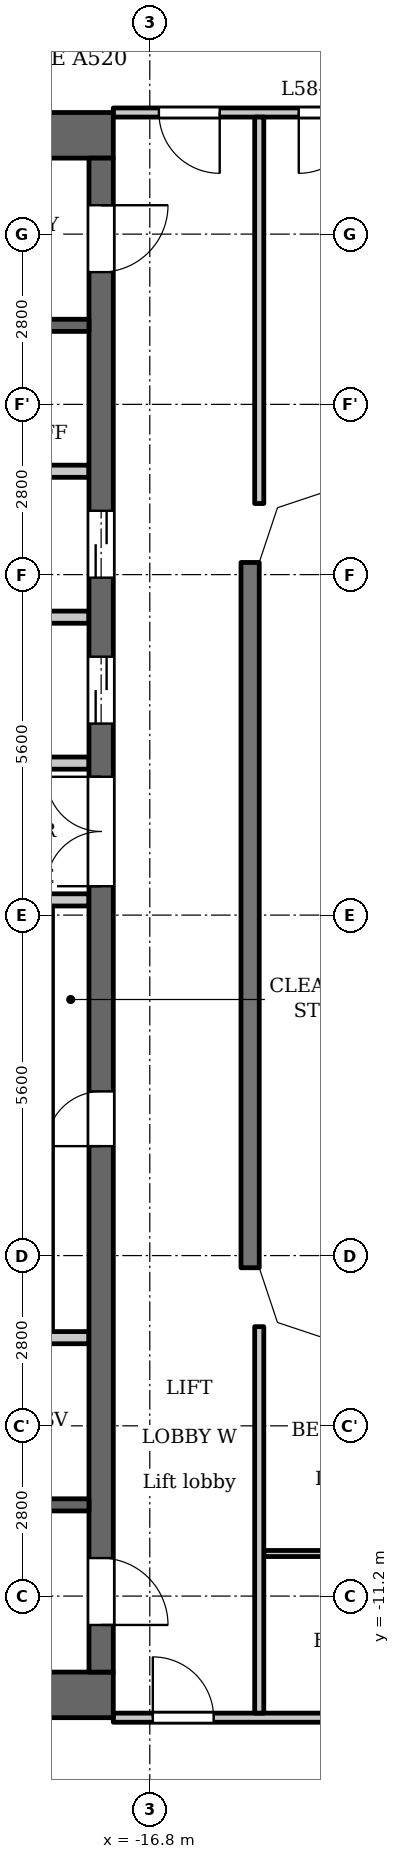
"""IFC4 building model, lengths in metres.
Left out: names, types, materials, properties, quantities, classifications, styles, units other than length and angle.
Written with IfcOpenShell. Run it as: python <this file> out.ifc"""

import sys

from ifc_helpers import new_model, si_unit, direction, frame, frame_2d, origin, place, context, subcontext, project, spatial, polyline, rectangle, outline, extrude, element, fill, save


model = new_model("IFC4")
c1 = context("Model", 3, precision=1e-05, world=origin(), true_north=direction((0.0, 1.0)))
c2 = subcontext(c1, "Body", "Model", "MODEL_VIEW")
j1 = project(units=[si_unit("LENGTHUNIT", "METRE"), si_unit("PLANEANGLEUNIT", "RADIAN")], contexts=[c1])
p1 = place(None, origin())
s1 = spatial("IfcSite", under=j1, at=p1, CompositionType="ELEMENT")
p2 = place(p1, origin())
s2 = spatial("IfcBuilding", under=s1, at=p2, CompositionType="ELEMENT")
p3 = place(p2, frame((0.0, 0.0, 223.9)))
s3 = spatial("IfcBuildingStorey", under=s2, at=p3, CompositionType="ELEMENT", Elevation=223.9)
p4 = place(p3, frame((-15.15, -5.8, 0.0), z_axis=(0.0, 0.0, 1.0), x_axis=(0.0, 1.0, 0.0)))
e1 = element("IfcWall", 1, at=p4, inside=s3, PredefinedType="SOLIDWALL", context=c2, shape_type="SweptSolid", body=[
    extrude(rectangle(XDim=11.6, YDim=0.3, at=frame_2d((5.8, 0.0))), origin(), (0.0, 0.0, 1.0), 3.2),
])
for number, where, z_axis, x_axis in (
    (2, (-17.4, 12.825, 0.0), (0.0, 0.0, 1.0), (-1.0, 0.0, 0.0)),
    (3, (-17.4, -12.825, 0.0), (0.0, 0.0, 1.0), (-1.0, 0.0, 0.0)),
):
    element("IfcWall", number, at=place(p3, frame(where, z_axis=z_axis, x_axis=x_axis)), inside=s3, PredefinedType="SHEAR", context=c2, shape_type="SweptSolid", body=[
        extrude(rectangle(XDim=7.6, YDim=0.75, at=frame_2d((3.8, 0.0))), origin(), (0.0, 0.0, 1.0), 3.2),
    ])
p5 = place(p3, frame((-17.6, -12.45, 0.0), z_axis=(0.0, 0.0, 1.0), x_axis=(0.0, 1.0, 0.0)))
e4 = element("IfcWall", 4, at=p5, inside=s3, PredefinedType="SHEAR", context=c2, shape_type="SweptSolid", body=[
    extrude(rectangle(XDim=24.9, YDim=0.4, at=frame_2d((12.45, 0.0))), origin(), (0.0, 0.0, 1.0), 3.2),
])
p6 = place(p5, frame((8.65, 0.0, 0.0)))
e5 = element("IfcOpeningElement", 5, at=p6, cuts=e4, PredefinedType="OPENING", context=c2, shape_type="SweptSolid", body=[
    extrude(rectangle(XDim=0.9, YDim=2.1, at=frame_2d((0.45, 1.05))), frame((0.0, 0.21, 0.0), z_axis=(0.0, -1.0, 0.0), x_axis=(1.0, 0.0, 0.0)), (0.0, 0.0, 1.0), 0.42),
])
p7 = place(p5, frame((15.6, 0.0, 0.0)))
e6 = element("IfcOpeningElement", 6, at=p7, cuts=e4, PredefinedType="OPENING", context=c2, shape_type="SweptSolid", body=[
    extrude(rectangle(XDim=1.1, YDim=2.1, at=frame_2d((0.55, 1.05))), frame((0.0, 0.21, 0.0), z_axis=(0.0, -1.0, 0.0), x_axis=(1.0, 0.0, 0.0)), (0.0, 0.0, 1.0), 0.42),
])
p8 = place(p5, frame((18.0, 0.0, 0.0)))
e7 = element("IfcOpeningElement", 7, at=p8, cuts=e4, PredefinedType="OPENING", context=c2, shape_type="SweptSolid", body=[
    extrude(rectangle(XDim=1.1, YDim=2.1, at=frame_2d((0.55, 1.05))), frame((0.0, 0.21, 0.0), z_axis=(0.0, -1.0, 0.0), x_axis=(1.0, 0.0, 0.0)), (0.0, 0.0, 1.0), 0.42),
])
p9 = place(p5, frame((23.025, 0.0, 0.0)))
e8 = element("IfcOpeningElement", 8, at=p9, cuts=e4, PredefinedType="OPENING", context=c2, shape_type="SweptSolid", body=[
    extrude(rectangle(XDim=1.1, YDim=2.1, at=frame_2d((0.55, 1.05))), frame((0.0, 0.21, 0.0), z_axis=(0.0, -1.0, 0.0), x_axis=(1.0, 0.0, 0.0)), (0.0, 0.0, 1.0), 0.42),
])
p10 = place(p5, frame((0.775, 0.0, 0.0)))
e9 = element("IfcOpeningElement", 9, at=p10, cuts=e4, PredefinedType="OPENING", context=c2, shape_type="SweptSolid", body=[
    extrude(rectangle(XDim=1.1, YDim=2.1, at=frame_2d((0.55, 1.05))), frame((0.0, 0.21, 0.0), z_axis=(0.0, -1.0, 0.0), x_axis=(1.0, 0.0, 0.0)), (0.0, 0.0, 1.0), 0.42),
])
p11 = place(p5, frame((12.925, 0.0, 0.0)))
e10 = element("IfcOpeningElement", 10, at=p11, cuts=e4, PredefinedType="OPENING", context=c2, shape_type="SweptSolid", body=[
    extrude(rectangle(XDim=1.8, YDim=2.1, at=frame_2d((0.9, 1.05))), frame((0.0, 0.21, 0.0), z_axis=(0.0, -1.0, 0.0), x_axis=(1.0, 0.0, 0.0)), (0.0, 0.0, 1.0), 0.42),
])
p12 = place(p3, frame((-17.8, -9.7, 0.0), z_axis=(0.0, 0.0, 1.0), x_axis=(-1.0, 0.0, 0.0)))
e11 = element("IfcWall", 11, at=p12, inside=s3, PredefinedType="SHEAR", context=c2, shape_type="SweptSolid", body=[
    extrude(rectangle(XDim=5.65, YDim=0.2, at=frame_2d((2.825, 0.0))), origin(), (0.0, 0.0, 1.0), 3.2),
])
p13 = place(p12, frame((0.85, 0.0, 0.0)))
e12 = element("IfcOpeningElement", 12, at=p13, cuts=e11, PredefinedType="OPENING", context=c2, shape_type="SweptSolid", body=[
    extrude(rectangle(XDim=1.1, YDim=2.1, at=frame_2d((0.55, 1.05))), frame((0.0, 0.11, 0.0), z_axis=(0.0, -1.0, 0.0), x_axis=(1.0, 0.0, 0.0)), (0.0, 0.0, 1.0), 0.22),
])
p14 = place(p12, frame((3.75, 0.0, 0.0)))
e13 = element("IfcOpeningElement", 13, at=p14, cuts=e11, PredefinedType="OPENING", context=c2, shape_type="SweptSolid", body=[
    extrude(rectangle(XDim=1.1, YDim=2.1, at=frame_2d((0.55, 1.05))), frame((0.0, 0.11, 0.0), z_axis=(0.0, -1.0, 0.0), x_axis=(1.0, 0.0, 0.0)), (0.0, 0.0, 1.0), 0.22),
])
p15 = place(p3, frame((-17.8, -6.95, 0.0), z_axis=(0.0, 0.0, 1.0), x_axis=(-1.0, 0.0, 0.0)))
e14 = element("IfcWall", 14, at=p15, inside=s3, PredefinedType="PARTITIONING", context=c2, shape_type="SweptSolid", body=[
    extrude(rectangle(XDim=2.8, YDim=0.2, at=frame_2d((1.4, 0.0))), origin(), (0.0, 0.0, 1.0), 3.2),
])
p16 = place(p3, frame((-17.8, 0.25, 0.0), z_axis=(0.0, 0.0, 1.0), x_axis=(-1.0, 0.0, 0.0)))
e15 = element("IfcWall", 15, at=p16, inside=s3, PredefinedType="PARTITIONING", context=c2, shape_type="SweptSolid", body=[
    extrude(rectangle(XDim=3.0, YDim=0.2, at=frame_2d((1.5, 0.0))), origin(), (0.0, 0.0, 1.0), 3.2),
])
p17 = place(p16, frame((1.35, 0.0, 0.0)))
e16 = element("IfcOpeningElement", 16, at=p17, cuts=e15, PredefinedType="OPENING", context=c2, shape_type="SweptSolid", body=[
    extrude(rectangle(XDim=0.9, YDim=2.1, at=frame_2d((0.45, 1.05))), frame((0.0, 0.11, 0.0), z_axis=(0.0, -1.0, 0.0), x_axis=(1.0, 0.0, 0.0)), (0.0, 0.0, 1.0), 0.22),
])
p18 = place(p3, frame((-17.8, 2.5, 0.0), z_axis=(0.0, 0.0, 1.0), x_axis=(-1.0, 0.0, 0.0)))
e17 = element("IfcWall", 17, at=p18, inside=s3, PredefinedType="PARTITIONING", context=c2, shape_type="SweptSolid", body=[
    extrude(rectangle(XDim=3.0, YDim=0.2, at=frame_2d((1.5, 0.0))), origin(), (0.0, 0.0, 1.0), 3.2),
])
for number, where, z_axis, x_axis in (
    (18, (-17.8, 4.9, 0.0), (0.0, 0.0, 1.0), (-1.0, 0.0, 0.0)),
    (19, (-17.8, 7.3, 0.0), (0.0, 0.0, 1.0), (-1.0, 0.0, 0.0)),
):
    element("IfcWall", number, at=place(p3, frame(where, z_axis=z_axis, x_axis=x_axis)), inside=s3, PredefinedType="PARTITIONING", context=c2, shape_type="SweptSolid", body=[
        extrude(rectangle(XDim=2.8, YDim=0.2, at=frame_2d((1.4, 0.0))), origin(), (0.0, 0.0, 1.0), 3.2),
    ])
p19 = place(p3, frame((-17.8, 9.7, 0.0), z_axis=(0.0, 0.0, 1.0), x_axis=(-1.0, 0.0, 0.0)))
e20 = element("IfcWall", 20, at=p19, inside=s3, PredefinedType="SHEAR", context=c2, shape_type="SweptSolid", body=[
    extrude(rectangle(XDim=5.65, YDim=0.2, at=frame_2d((2.825, 0.0))), origin(), (0.0, 0.0, 1.0), 3.2),
])
p20 = place(p19, frame((0.85, 0.0, 0.0)))
e21 = element("IfcOpeningElement", 21, at=p20, cuts=e20, PredefinedType="OPENING", context=c2, shape_type="SweptSolid", body=[
    extrude(rectangle(XDim=1.1, YDim=2.1, at=frame_2d((0.55, 1.05))), frame((0.0, 0.11, 0.0), z_axis=(0.0, -1.0, 0.0), x_axis=(1.0, 0.0, 0.0)), (0.0, 0.0, 1.0), 0.22),
])
p21 = place(p19, frame((3.75, 0.0, 0.0)))
e22 = element("IfcOpeningElement", 22, at=p21, cuts=e20, PredefinedType="OPENING", context=c2, shape_type="SweptSolid", body=[
    extrude(rectangle(XDim=1.1, YDim=2.1, at=frame_2d((0.55, 1.05))), frame((0.0, 0.11, 0.0), z_axis=(0.0, -1.0, 0.0), x_axis=(1.0, 0.0, 0.0)), (0.0, 0.0, 1.0), 0.22),
])
p22 = place(p3, frame((-17.4, -13.2, 0.0), z_axis=(0.0, 0.0, 1.0), x_axis=(1.0, 0.0, 0.0)))
e23 = element("IfcWall", 23, at=p22, inside=s3, PredefinedType="PARTITIONING", context=c2, shape_type="SweptSolid", body=[
    extrude(rectangle(XDim=34.8, YDim=0.15, at=frame_2d((17.4, 0.0))), origin(), (0.0, 0.0, 1.0), 3.2),
])
p23 = place(p22, frame((0.65, 0.0, 0.0)))
e24 = element("IfcOpeningElement", 24, at=p23, cuts=e23, PredefinedType="OPENING", context=c2, shape_type="SweptSolid", body=[
    extrude(rectangle(XDim=1.0, YDim=2.1, at=frame_2d((0.5, 1.05))), frame((0.0, 0.085, 0.0), z_axis=(0.0, -1.0, 0.0), x_axis=(1.0, 0.0, 0.0)), (0.0, 0.0, 1.0), 0.17),
])
p24 = place(p22, frame((33.05, 0.0, 0.0)))
e25 = element("IfcOpeningElement", 25, at=p24, cuts=e23, PredefinedType="OPENING", context=c2, shape_type="SweptSolid", body=[
    extrude(rectangle(XDim=1.0, YDim=2.1, at=frame_2d((0.5, 1.05))), frame((0.0, 0.085, 0.0), z_axis=(0.0, -1.0, 0.0), x_axis=(1.0, 0.0, 0.0)), (0.0, 0.0, 1.0), 0.17),
])
p25 = place(p22, frame((10.15, 0.0, 0.0)))
e26 = element("IfcOpeningElement", 26, at=p25, cuts=e23, PredefinedType="OPENING", context=c2, shape_type="SweptSolid", body=[
    extrude(rectangle(XDim=1.0, YDim=2.1, at=frame_2d((0.5, 1.05))), frame((0.0, 0.085, 0.0), z_axis=(0.0, -1.0, 0.0), x_axis=(1.0, 0.0, 0.0)), (0.0, 0.0, 1.0), 0.17),
])
p26 = place(p22, frame((12.5, 0.0, 0.0)))
e27 = element("IfcOpeningElement", 27, at=p26, cuts=e23, PredefinedType="OPENING", context=c2, shape_type="SweptSolid", body=[
    extrude(rectangle(XDim=1.0, YDim=2.1, at=frame_2d((0.5, 1.05))), frame((0.0, 0.085, 0.0), z_axis=(0.0, -1.0, 0.0), x_axis=(1.0, 0.0, 0.0)), (0.0, 0.0, 1.0), 0.17),
])
p27 = place(p22, frame((18.0, 0.0, 0.0)))
e28 = element("IfcOpeningElement", 28, at=p27, cuts=e23, PredefinedType="OPENING", context=c2, shape_type="SweptSolid", body=[
    extrude(rectangle(XDim=1.0, YDim=2.1, at=frame_2d((0.5, 1.05))), frame((0.0, 0.085, 0.0), z_axis=(0.0, -1.0, 0.0), x_axis=(1.0, 0.0, 0.0)), (0.0, 0.0, 1.0), 0.17),
])
p28 = place(p22, frame((30.75, 0.0, 0.0)))
e29 = element("IfcOpeningElement", 29, at=p28, cuts=e23, PredefinedType="OPENING", context=c2, shape_type="SweptSolid", body=[
    extrude(rectangle(XDim=1.0, YDim=2.1, at=frame_2d((0.5, 1.05))), frame((0.0, 0.085, 0.0), z_axis=(0.0, -1.0, 0.0), x_axis=(1.0, 0.0, 0.0)), (0.0, 0.0, 1.0), 0.17),
])
p29 = place(p3, frame((-14.925, -10.5, 0.0), z_axis=(0.0, 0.0, 1.0), x_axis=(1.0, 0.0, 0.0)))
e30 = element("IfcWall", 30, at=p29, inside=s3, PredefinedType="PARTITIONING", context=c2, shape_type="SweptSolid", body=[
    extrude(rectangle(XDim=29.85, YDim=0.1, at=frame_2d((14.925, 0.0))), origin(), (0.0, 0.0, 1.0), 3.2),
])
p30 = place(p29, frame((2.325, 0.0, 0.0)))
e31 = element("IfcOpeningElement", 31, at=p30, cuts=e30, PredefinedType="OPENING", context=c2, shape_type="SweptSolid", body=[
    extrude(rectangle(XDim=0.8, YDim=2.1, at=frame_2d((0.4, 1.05))), frame((0.0, 0.06, 0.0), z_axis=(0.0, -1.0, 0.0), x_axis=(1.0, 0.0, 0.0)), (0.0, 0.0, 1.0), 0.12),
])
p31 = place(p29, frame((7.775, 0.0, 0.0)))
e32 = element("IfcOpeningElement", 32, at=p31, cuts=e30, PredefinedType="OPENING", context=c2, shape_type="SweptSolid", body=[
    extrude(rectangle(XDim=0.9, YDim=2.1, at=frame_2d((0.45, 1.05))), frame((0.0, 0.06, 0.0), z_axis=(0.0, -1.0, 0.0), x_axis=(1.0, 0.0, 0.0)), (0.0, 0.0, 1.0), 0.12),
])
p32 = place(p29, frame((13.575, 0.0, 0.0)))
e33 = element("IfcOpeningElement", 33, at=p32, cuts=e30, PredefinedType="OPENING", context=c2, shape_type="SweptSolid", body=[
    extrude(rectangle(XDim=0.8, YDim=2.1, at=frame_2d((0.4, 1.05))), frame((0.0, 0.06, 0.0), z_axis=(0.0, -1.0, 0.0), x_axis=(1.0, 0.0, 0.0)), (0.0, 0.0, 1.0), 0.12),
])
p33 = place(p29, frame((10.125, 0.0, 0.0)))
e34 = element("IfcOpeningElement", 34, at=p33, cuts=e30, PredefinedType="OPENING", context=c2, shape_type="SweptSolid", body=[
    extrude(rectangle(XDim=0.9, YDim=2.1, at=frame_2d((0.45, 1.05))), frame((0.0, 0.06, 0.0), z_axis=(0.0, -1.0, 0.0), x_axis=(1.0, 0.0, 0.0)), (0.0, 0.0, 1.0), 0.12),
])
p34 = place(p29, frame((18.825, 0.0, 0.0)))
e35 = element("IfcOpeningElement", 35, at=p34, cuts=e30, PredefinedType="OPENING", context=c2, shape_type="SweptSolid", body=[
    extrude(rectangle(XDim=0.8, YDim=2.1, at=frame_2d((0.4, 1.05))), frame((0.0, 0.06, 0.0), z_axis=(0.0, -1.0, 0.0), x_axis=(1.0, 0.0, 0.0)), (0.0, 0.0, 1.0), 0.12),
])
p35 = place(p29, frame((15.625, 0.0, 0.0)))
e36 = element("IfcOpeningElement", 36, at=p35, cuts=e30, PredefinedType="OPENING", context=c2, shape_type="SweptSolid", body=[
    extrude(rectangle(XDim=0.9, YDim=2.1, at=frame_2d((0.45, 1.05))), frame((0.0, 0.06, 0.0), z_axis=(0.0, -1.0, 0.0), x_axis=(1.0, 0.0, 0.0)), (0.0, 0.0, 1.0), 0.12),
])
p36 = place(p29, frame((24.675, 0.0, 0.0)))
e37 = element("IfcOpeningElement", 37, at=p36, cuts=e30, PredefinedType="OPENING", context=c2, shape_type="SweptSolid", body=[
    extrude(rectangle(XDim=0.8, YDim=2.1, at=frame_2d((0.4, 1.05))), frame((0.0, 0.06, 0.0), z_axis=(0.0, -1.0, 0.0), x_axis=(1.0, 0.0, 0.0)), (0.0, 0.0, 1.0), 0.12),
])
p37 = place(p29, frame((28.375, 0.0, 0.0)))
e38 = element("IfcOpeningElement", 38, at=p37, cuts=e30, PredefinedType="OPENING", context=c2, shape_type="SweptSolid", body=[
    extrude(rectangle(XDim=0.9, YDim=2.1, at=frame_2d((0.45, 1.05))), frame((0.0, 0.06, 0.0), z_axis=(0.0, -1.0, 0.0), x_axis=(1.0, 0.0, 0.0)), (0.0, 0.0, 1.0), 0.12),
])
p38 = place(p3, frame((-17.4, 13.2, 0.0), z_axis=(0.0, 0.0, 1.0), x_axis=(1.0, 0.0, 0.0)))
e39 = element("IfcWall", 39, at=p38, inside=s3, PredefinedType="PARTITIONING", context=c2, shape_type="SweptSolid", body=[
    extrude(rectangle(XDim=34.8, YDim=0.15, at=frame_2d((17.4, 0.0))), origin(), (0.0, 0.0, 1.0), 3.2),
])
p39 = place(p38, frame((0.75, 0.0, 0.0)))
e40 = element("IfcOpeningElement", 40, at=p39, cuts=e39, PredefinedType="OPENING", context=c2, shape_type="SweptSolid", body=[
    extrude(rectangle(XDim=1.0, YDim=2.1, at=frame_2d((0.5, 1.05))), frame((0.0, 0.085, 0.0), z_axis=(0.0, -1.0, 0.0), x_axis=(1.0, 0.0, 0.0)), (0.0, 0.0, 1.0), 0.17),
])
p40 = place(p38, frame((33.15, 0.0, 0.0)))
e41 = element("IfcOpeningElement", 41, at=p40, cuts=e39, PredefinedType="OPENING", context=c2, shape_type="SweptSolid", body=[
    extrude(rectangle(XDim=1.0, YDim=2.1, at=frame_2d((0.5, 1.05))), frame((0.0, 0.085, 0.0), z_axis=(0.0, -1.0, 0.0), x_axis=(1.0, 0.0, 0.0)), (0.0, 0.0, 1.0), 0.17),
])
p41 = place(p38, frame((3.05, 0.0, 0.0)))
e42 = element("IfcOpeningElement", 42, at=p41, cuts=e39, PredefinedType="OPENING", context=c2, shape_type="SweptSolid", body=[
    extrude(rectangle(XDim=1.0, YDim=2.1, at=frame_2d((0.5, 1.05))), frame((0.0, 0.085, 0.0), z_axis=(0.0, -1.0, 0.0), x_axis=(1.0, 0.0, 0.0)), (0.0, 0.0, 1.0), 0.17),
])
p42 = place(p38, frame((10.1, 0.0, 0.0)))
e43 = element("IfcOpeningElement", 43, at=p42, cuts=e39, PredefinedType="OPENING", context=c2, shape_type="SweptSolid", body=[
    extrude(rectangle(XDim=1.0, YDim=2.1, at=frame_2d((0.5, 1.05))), frame((0.0, 0.085, 0.0), z_axis=(0.0, -1.0, 0.0), x_axis=(1.0, 0.0, 0.0)), (0.0, 0.0, 1.0), 0.17),
])
p43 = place(p38, frame((12.45, 0.0, 0.0)))
e44 = element("IfcOpeningElement", 44, at=p43, cuts=e39, PredefinedType="OPENING", context=c2, shape_type="SweptSolid", body=[
    extrude(rectangle(XDim=1.0, YDim=2.1, at=frame_2d((0.5, 1.05))), frame((0.0, 0.085, 0.0), z_axis=(0.0, -1.0, 0.0), x_axis=(1.0, 0.0, 0.0)), (0.0, 0.0, 1.0), 0.17),
])
p44 = place(p38, frame((21.3, 0.0, 0.0)))
e45 = element("IfcOpeningElement", 45, at=p44, cuts=e39, PredefinedType="OPENING", context=c2, shape_type="SweptSolid", body=[
    extrude(rectangle(XDim=1.0, YDim=2.1, at=frame_2d((0.5, 1.05))), frame((0.0, 0.085, 0.0), z_axis=(0.0, -1.0, 0.0), x_axis=(1.0, 0.0, 0.0)), (0.0, 0.0, 1.0), 0.17),
])
p45 = place(p38, frame((23.65, 0.0, 0.0)))
e46 = element("IfcOpeningElement", 46, at=p45, cuts=e39, PredefinedType="OPENING", context=c2, shape_type="SweptSolid", body=[
    extrude(rectangle(XDim=1.0, YDim=2.1, at=frame_2d((0.5, 1.05))), frame((0.0, 0.085, 0.0), z_axis=(0.0, -1.0, 0.0), x_axis=(1.0, 0.0, 0.0)), (0.0, 0.0, 1.0), 0.17),
])
p46 = place(p38, frame((30.75, 0.0, 0.0)))
e47 = element("IfcOpeningElement", 47, at=p46, cuts=e39, PredefinedType="OPENING", context=c2, shape_type="SweptSolid", body=[
    extrude(rectangle(XDim=1.0, YDim=2.1, at=frame_2d((0.5, 1.05))), frame((0.0, 0.085, 0.0), z_axis=(0.0, -1.0, 0.0), x_axis=(1.0, 0.0, 0.0)), (0.0, 0.0, 1.0), 0.17),
])
for number, where, z_axis, x_axis in (
    (48, (-15.0, -13.125, 0.0), (0.0, 0.0, 1.0), (0.0, 1.0, 0.0)),
    (49, (-15.0, 6.769, 0.0), (0.0, 0.0, 1.0), (0.0, 1.0, 0.0)),
):
    element("IfcWall", number, at=place(p3, frame(where, z_axis=z_axis, x_axis=x_axis)), inside=s3, PredefinedType="PARTITIONING", context=c2, shape_type="SweptSolid", body=[
        extrude(rectangle(XDim=6.356, YDim=0.15, at=frame_2d((3.178, 0.0))), origin(), (0.0, 0.0, 1.0), 3.2),
    ])
p47 = place(p3, origin())
e50 = element("IfcWall", 50, at=p47, inside=s3, PredefinedType="SOLIDWALL", context=c2, shape_type="SweptSolid", body=[
    extrude(outline(polyline([(-13.849, 7.3), (-14.937, 6.937), (-15.3, 5.849), (-15.3, 5.8), (-15.0, 5.8), (-14.7, 6.7), (-13.8, 7.0), (-13.8, 7.3), (-13.849, 7.3)])), origin(), (0.0, 0.0, 1.0), 3.2),
])
e51 = element("IfcWall", 51, at=p47, inside=s3, PredefinedType="SOLIDWALL", context=c2, shape_type="SweptSolid", body=[
    extrude(outline(polyline([(-14.937, -6.937), (-13.849, -7.3), (-13.8, -7.3), (-13.8, -7.0), (-14.7, -6.7), (-15.0, -5.8), (-15.3, -5.8), (-15.3, -5.849), (-14.937, -6.937)])), origin(), (0.0, 0.0, 1.0), 3.2),
])
p48 = place(p6, origin())
e52 = element("IfcDoor", 52, at=p48, inside=s3, OperationType="SINGLE_SWING_RIGHT", PredefinedType="DOOR", context=c2, shape_type="SweptSolid", body=[
    extrude(rectangle(XDim=0.9, YDim=2.1, at=frame_2d((0.45, 1.05))), frame((0.0, 0.025, 0.0), z_axis=(0.0, -1.0, 0.0), x_axis=(1.0, 0.0, 0.0)), (0.0, 0.0, 1.0), 0.05),
])
fill(e5, e52)
p49 = place(p7, origin())
e53 = element("IfcDoor", 53, at=p49, inside=s3, OperationType="DOUBLE_DOOR_SLIDING", PredefinedType="DOOR", context=c2, shape_type="SweptSolid", body=[
    extrude(rectangle(XDim=1.1, YDim=2.1, at=frame_2d((0.55, 1.05))), frame((0.0, 0.025, 0.0), z_axis=(0.0, -1.0, 0.0), x_axis=(1.0, 0.0, 0.0)), (0.0, 0.0, 1.0), 0.05),
])
fill(e6, e53)
p50 = place(p8, origin())
e54 = element("IfcDoor", 54, at=p50, inside=s3, OperationType="DOUBLE_DOOR_SLIDING", PredefinedType="DOOR", context=c2, shape_type="SweptSolid", body=[
    extrude(rectangle(XDim=1.1, YDim=2.1, at=frame_2d((0.55, 1.05))), frame((0.0, 0.025, 0.0), z_axis=(0.0, -1.0, 0.0), x_axis=(1.0, 0.0, 0.0)), (0.0, 0.0, 1.0), 0.05),
])
fill(e7, e54)
p51 = place(p9, origin())
e55 = element("IfcDoor", 55, at=p51, inside=s3, OperationType="SINGLE_SWING_RIGHT", PredefinedType="DOOR", context=c2, shape_type="SweptSolid", body=[
    extrude(rectangle(XDim=1.1, YDim=2.1, at=frame_2d((0.55, 1.05))), frame((0.0, 0.025, 0.0), z_axis=(0.0, -1.0, 0.0), x_axis=(1.0, 0.0, 0.0)), (0.0, 0.0, 1.0), 0.05),
])
fill(e8, e55)
p52 = place(p10, origin())
e56 = element("IfcDoor", 56, at=p52, inside=s3, OperationType="SINGLE_SWING_LEFT", PredefinedType="DOOR", context=c2, shape_type="SweptSolid", body=[
    extrude(rectangle(XDim=1.1, YDim=2.1, at=frame_2d((0.55, 1.05))), frame((0.0, 0.025, 0.0), z_axis=(0.0, -1.0, 0.0), x_axis=(1.0, 0.0, 0.0)), (0.0, 0.0, 1.0), 0.05),
])
fill(e9, e56)
p53 = place(p11, origin())
e57 = element("IfcDoor", 57, at=p53, inside=s3, OperationType="DOUBLE_DOOR_SINGLE_SWING", PredefinedType="DOOR", context=c2, shape_type="SweptSolid", body=[
    extrude(rectangle(XDim=1.8, YDim=2.1, at=frame_2d((0.9, 1.05))), frame((0.0, 0.025, 0.0), z_axis=(0.0, -1.0, 0.0), x_axis=(1.0, 0.0, 0.0)), (0.0, 0.0, 1.0), 0.05),
])
fill(e10, e57)
p54 = place(p39, origin())
e58 = element("IfcDoor", 58, at=p54, inside=s3, OperationType="SINGLE_SWING_RIGHT", PredefinedType="DOOR", context=c2, shape_type="SweptSolid", body=[
    extrude(rectangle(XDim=1.0, YDim=2.1, at=frame_2d((0.5, 1.05))), frame((0.0, 0.025, 0.0), z_axis=(0.0, -1.0, 0.0), x_axis=(1.0, 0.0, 0.0)), (0.0, 0.0, 1.0), 0.05),
])
fill(e40, e58)
p55 = place(p23, origin())
e59 = element("IfcDoor", 59, at=p55, inside=s3, OperationType="SINGLE_SWING_RIGHT", PredefinedType="DOOR", context=c2, shape_type="SweptSolid", body=[
    extrude(rectangle(XDim=1.0, YDim=2.1, at=frame_2d((0.5, 1.05))), frame((0.0, 0.025, 0.0), z_axis=(0.0, -1.0, 0.0), x_axis=(1.0, 0.0, 0.0)), (0.0, 0.0, 1.0), 0.05),
])
fill(e24, e59)
p56 = place(p41, origin())
e60 = element("IfcDoor", 60, at=p56, inside=s3, OperationType="SINGLE_SWING_LEFT", PredefinedType="DOOR", context=c2, shape_type="SweptSolid", body=[
    extrude(rectangle(XDim=1.0, YDim=2.1, at=frame_2d((0.5, 1.05))), frame((0.0, 0.025, 0.0), z_axis=(0.0, -1.0, 0.0), x_axis=(1.0, 0.0, 0.0)), (0.0, 0.0, 1.0), 0.05),
])
fill(e42, e60)
save(model, sys.argv[1])
